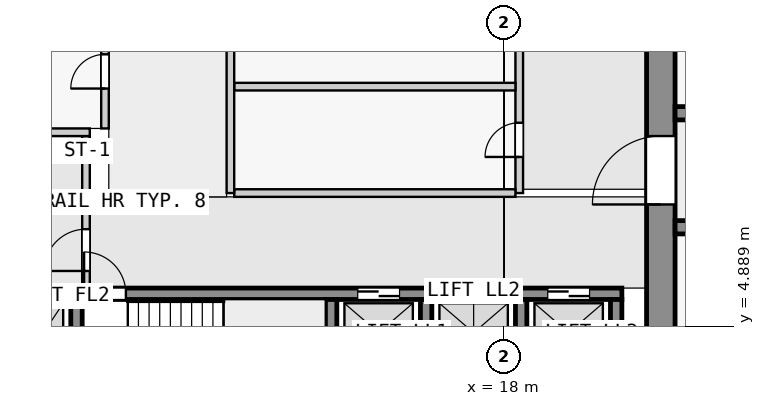
"""IFC4 building model, lengths in metres.
Left out: names, types, materials, properties, quantities, classifications, styles, units other than length and angle.
Written with IfcOpenShell. Run it as: python <this file> out.ifc"""

import sys

from ifc_helpers import new_model, si_unit, direction, frame, frame_2d, origin, place, context, subcontext, project, spatial, rectangle, extrude, element, fill, save


model = new_model("IFC4")
c1 = context("Model", 3, precision=1e-05, world=origin(), true_north=direction((0.0, 1.0)))
c2 = subcontext(c1, "Body", "Model", "MODEL_VIEW")
j1 = project(units=[si_unit("LENGTHUNIT", "METRE"), si_unit("PLANEANGLEUNIT", "RADIAN")], contexts=[c1])
p1 = place(None, origin())
s1 = spatial("IfcSite", under=j1, at=p1, CompositionType="ELEMENT")
p2 = place(p1, origin())
s2 = spatial("IfcBuilding", under=s1, at=p2, CompositionType="ELEMENT")
p3 = place(p2, frame((0.0, 0.0, 26.8)))
s3 = spatial("IfcBuildingStorey", under=s2, at=p3, CompositionType="ELEMENT", Elevation=26.8)
p4 = place(p3, frame((22.125, 2.5, 0.0), z_axis=(0.0, 0.0, 1.0), x_axis=(0.0, 1.0, 0.0)))
e1 = element("IfcWall", 1, at=p4, inside=s3, PredefinedType="SHEAR", context=c2, shape_type="SweptSolid", body=[
    extrude(rectangle(XDim=14.75, YDim=0.75, at=frame_2d((7.375, 0.0))), origin(), (0.0, 0.0, 1.0), 3.25),
])
p5 = place(p4, frame((5.6, 0.0, 0.0)))
e2 = element("IfcOpeningElement", 2, at=p5, cuts=e1, PredefinedType="OPENING", context=c2, shape_type="SweptSolid", body=[
    extrude(rectangle(XDim=1.8, YDim=2.1, at=frame_2d((0.9, 1.05))), frame((0.0, 0.385, 0.0), z_axis=(0.0, -1.0, 0.0), x_axis=(1.0, 0.0, 0.0)), (0.0, 0.0, 1.0), 0.77),
])
for number, where, z_axis, x_axis in (
    (3, (6.75, 2.8, 0.0), (0.0, 0.0, 1.0), (0.0, 1.0, 0.0)),
    (4, (13.45, 2.8, 0.0), (0.0, 0.0, 1.0), (0.0, 1.0, 0.0)),
    (5, (15.95, 2.8, 0.0), (0.0, 0.0, 1.0), (0.0, 1.0, 0.0)),
    (6, (18.45, 2.8, 0.0), (0.0, 0.0, 1.0), (0.0, 1.0, 0.0)),
    (7, (20.95, 2.8, 0.0), (0.0, 0.0, 1.0), (0.0, 1.0, 0.0)),
):
    element("IfcWall", number, at=place(p3, frame(where, z_axis=z_axis, x_axis=x_axis)), inside=s3, PredefinedType="SHEAR", context=c2, shape_type="SweptSolid", body=[
        extrude(rectangle(XDim=2.8, YDim=0.3, at=frame_2d((1.4, 0.0))), origin(), (0.0, 0.0, 1.0), 3.25),
    ])
p6 = place(p3, frame((2.3, 5.75, 0.0), z_axis=(0.0, 0.0, 1.0), x_axis=(1.0, 0.0, 0.0)))
e8 = element("IfcWall", 8, at=p6, inside=s3, PredefinedType="SHEAR", context=c2, shape_type="SweptSolid", body=[
    extrude(rectangle(XDim=18.8, YDim=0.3, at=frame_2d((9.4, 0.0))), origin(), (0.0, 0.0, 1.0), 3.25),
])
p7 = place(p6, frame((4.65, 0.0, 0.0)))
e9 = element("IfcOpeningElement", 9, at=p7, cuts=e8, PredefinedType="OPENING", context=c2, shape_type="SweptSolid", body=[
    extrude(rectangle(XDim=1.1, YDim=2.1, at=frame_2d((0.55, 1.05))), frame((0.0, 0.16, 0.0), z_axis=(0.0, -1.0, 0.0), x_axis=(1.0, 0.0, 0.0)), (0.0, 0.0, 1.0), 0.32),
])
p8 = place(p6, frame((0.45, 0.0, 0.0)))
e10 = element("IfcOpeningElement", 10, at=p8, cuts=e8, PredefinedType="OPENING", context=c2, shape_type="SweptSolid", body=[
    extrude(rectangle(XDim=1.1, YDim=2.1, at=frame_2d((0.55, 1.05))), frame((0.0, 0.16, 0.0), z_axis=(0.0, -1.0, 0.0), x_axis=(1.0, 0.0, 0.0)), (0.0, 0.0, 1.0), 0.32),
])
p9 = place(p6, frame((2.75, 0.0, 0.0)))
e11 = element("IfcOpeningElement", 11, at=p9, cuts=e8, PredefinedType="OPENING", context=c2, shape_type="SweptSolid", body=[
    extrude(rectangle(XDim=1.1, YDim=2.1, at=frame_2d((0.55, 1.05))), frame((0.0, 0.16, 0.0), z_axis=(0.0, -1.0, 0.0), x_axis=(1.0, 0.0, 0.0)), (0.0, 0.0, 1.0), 0.32),
])
p10 = place(p6, frame((11.85, 0.0, 0.0)))
e12 = element("IfcOpeningElement", 12, at=p10, cuts=e8, PredefinedType="OPENING", context=c2, shape_type="SweptSolid", body=[
    extrude(rectangle(XDim=1.1, YDim=2.1, at=frame_2d((0.55, 1.05))), frame((0.0, 0.16, 0.0), z_axis=(0.0, -1.0, 0.0), x_axis=(1.0, 0.0, 0.0)), (0.0, 0.0, 1.0), 0.32),
])
p11 = place(p6, frame((14.35, 0.0, 0.0)))
e13 = element("IfcOpeningElement", 13, at=p11, cuts=e8, PredefinedType="OPENING", context=c2, shape_type="SweptSolid", body=[
    extrude(rectangle(XDim=1.1, YDim=2.1, at=frame_2d((0.55, 1.05))), frame((0.0, 0.16, 0.0), z_axis=(0.0, -1.0, 0.0), x_axis=(1.0, 0.0, 0.0)), (0.0, 0.0, 1.0), 0.32),
])
p12 = place(p6, frame((16.85, 0.0, 0.0)))
e14 = element("IfcOpeningElement", 14, at=p12, cuts=e8, PredefinedType="OPENING", context=c2, shape_type="SweptSolid", body=[
    extrude(rectangle(XDim=1.1, YDim=2.1, at=frame_2d((0.55, 1.05))), frame((0.0, 0.16, 0.0), z_axis=(0.0, -1.0, 0.0), x_axis=(1.0, 0.0, 0.0)), (0.0, 0.0, 1.0), 0.32),
])
p13 = place(p3, frame((22.5, 7.5, 0.0), z_axis=(0.0, 0.0, 1.0), x_axis=(1.0, 0.0, 0.0)))
e15 = element("IfcWall", 15, at=p13, inside=s3, PredefinedType="SHEAR", context=c2, shape_type="SweptSolid", body=[
    extrude(rectangle(XDim=22.5, YDim=0.35, at=frame_2d((11.25, 0.0))), origin(), (0.0, 0.0, 1.0), 3.25),
])
p14 = place(p13, frame((4.05, 0.0, 0.0)))
e16 = element("IfcOpeningElement", 16, at=p14, cuts=e15, PredefinedType="OPENING", context=c2, shape_type="SweptSolid", body=[
    extrude(rectangle(XDim=1.0, YDim=2.1, at=frame_2d((0.5, 1.05))), frame((0.0, 0.185, 0.0), z_axis=(0.0, -1.0, 0.0), x_axis=(1.0, 0.0, 0.0)), (0.0, 0.0, 1.0), 0.37),
])
p15 = place(p13, frame((10.75, 0.0, 0.0)))
e17 = element("IfcOpeningElement", 17, at=p15, cuts=e15, PredefinedType="OPENING", context=c2, shape_type="SweptSolid", body=[
    extrude(rectangle(XDim=1.0, YDim=2.1, at=frame_2d((0.5, 1.05))), frame((0.0, 0.185, 0.0), z_axis=(0.0, -1.0, 0.0), x_axis=(1.0, 0.0, 0.0)), (0.0, 0.0, 1.0), 0.37),
])
p16 = place(p13, frame((15.25, 0.0, 0.0)))
e18 = element("IfcOpeningElement", 18, at=p16, cuts=e15, PredefinedType="OPENING", context=c2, shape_type="SweptSolid", body=[
    extrude(rectangle(XDim=1.0, YDim=2.1, at=frame_2d((0.5, 1.05))), frame((0.0, 0.185, 0.0), z_axis=(0.0, -1.0, 0.0), x_axis=(1.0, 0.0, 0.0)), (0.0, 0.0, 1.0), 0.37),
])
p17 = place(p13, frame((18.75, 0.0, 0.0)))
e19 = element("IfcOpeningElement", 19, at=p17, cuts=e15, PredefinedType="OPENING", context=c2, shape_type="SweptSolid", body=[
    extrude(rectangle(XDim=0.9, YDim=2.1, at=frame_2d((0.45, 1.05))), frame((0.0, 0.185, 0.0), z_axis=(0.0, -1.0, 0.0), x_axis=(1.0, 0.0, 0.0)), (0.0, 0.0, 1.0), 0.37),
])
p18 = place(p13, frame((20.95, 0.0, 0.0)))
e20 = element("IfcOpeningElement", 20, at=p18, cuts=e15, PredefinedType="OPENING", context=c2, shape_type="SweptSolid", body=[
    extrude(rectangle(XDim=1.0, YDim=2.1, at=frame_2d((0.5, 1.05))), frame((0.0, 0.185, 0.0), z_axis=(0.0, -1.0, 0.0), x_axis=(1.0, 0.0, 0.0)), (0.0, 0.0, 1.0), 0.37),
])
p19 = place(p3, frame((22.5, 10.5, 0.0), z_axis=(0.0, 0.0, 1.0), x_axis=(1.0, 0.0, 0.0)))
e21 = element("IfcWall", 21, at=p19, inside=s3, PredefinedType="SHEAR", context=c2, shape_type="SweptSolid", body=[
    extrude(rectangle(XDim=22.5, YDim=0.35, at=frame_2d((11.25, 0.0))), origin(), (0.0, 0.0, 1.0), 3.25),
])
p20 = place(p19, frame((6.05, 0.0, 0.0)))
e22 = element("IfcOpeningElement", 22, at=p20, cuts=e21, PredefinedType="OPENING", context=c2, shape_type="SweptSolid", body=[
    extrude(rectangle(XDim=1.0, YDim=2.1, at=frame_2d((0.5, 1.05))), frame((0.0, 0.185, 0.0), z_axis=(0.0, -1.0, 0.0), x_axis=(1.0, 0.0, 0.0)), (0.0, 0.0, 1.0), 0.37),
])
p21 = place(p19, frame((15.25, 0.0, 0.0)))
e23 = element("IfcOpeningElement", 23, at=p21, cuts=e21, PredefinedType="OPENING", context=c2, shape_type="SweptSolid", body=[
    extrude(rectangle(XDim=1.0, YDim=2.1, at=frame_2d((0.5, 1.05))), frame((0.0, 0.185, 0.0), z_axis=(0.0, -1.0, 0.0), x_axis=(1.0, 0.0, 0.0)), (0.0, 0.0, 1.0), 0.37),
])
p22 = place(p19, frame((19.75, 0.0, 0.0)))
e24 = element("IfcOpeningElement", 24, at=p22, cuts=e21, PredefinedType="OPENING", context=c2, shape_type="SweptSolid", body=[
    extrude(rectangle(XDim=1.0, YDim=2.1, at=frame_2d((0.5, 1.05))), frame((0.0, 0.185, 0.0), z_axis=(0.0, -1.0, 0.0), x_axis=(1.0, 0.0, 0.0)), (0.0, 0.0, 1.0), 0.37),
])
p23 = place(p3, frame((7.0, 5.9, 0.0), z_axis=(0.0, 0.0, 1.0), x_axis=(0.0, 1.0, 0.0)))
e25 = element("IfcWall", 25, at=p23, inside=s3, PredefinedType="PARTITIONING", context=c2, shape_type="SweptSolid", body=[
    extrude(rectangle(XDim=4.0, YDim=0.2, at=frame_2d((2.0, 0.0))), origin(), (0.0, 0.0, 1.0), 3.25),
])
p24 = place(p23, frame((0.45, 0.0, 0.0)))
e26 = element("IfcOpeningElement", 26, at=p24, cuts=e25, PredefinedType="OPENING", context=c2, shape_type="SweptSolid", body=[
    extrude(rectangle(XDim=1.1, YDim=2.1, at=frame_2d((0.55, 1.05))), frame((0.0, 0.11, 0.0), z_axis=(0.0, -1.0, 0.0), x_axis=(1.0, 0.0, 0.0)), (0.0, 0.0, 1.0), 0.22),
])
p25 = place(p3, frame((5.15, 10.0, 0.0), z_axis=(0.0, 0.0, 1.0), x_axis=(1.0, 0.0, 0.0)))
e27 = element("IfcWall", 27, at=p25, inside=s3, PredefinedType="PARTITIONING", context=c2, shape_type="SweptSolid", body=[
    extrude(rectangle(XDim=1.95, YDim=0.2, at=frame_2d((0.975, 0.0))), origin(), (0.0, 0.0, 1.0), 3.25),
])
p26 = place(p3, frame((10.8, 8.4, 0.0), z_axis=(0.0, 0.0, 1.0), x_axis=(0.0, 1.0, 0.0)))
e28 = element("IfcWall", 28, at=p26, inside=s3, PredefinedType="PARTITIONING", context=c2, shape_type="SweptSolid", body=[
    extrude(rectangle(XDim=6.2, YDim=0.2, at=frame_2d((3.1, 0.0))), origin(), (0.0, 0.0, 1.0), 3.25),
])
p27 = place(p3, frame((10.9, 8.4, 0.0), z_axis=(0.0, 0.0, 1.0), x_axis=(1.0, 0.0, 0.0)))
e29 = element("IfcWall", 29, at=p27, inside=s3, PredefinedType="PARTITIONING", context=c2, shape_type="SweptSolid", body=[
    extrude(rectangle(XDim=7.4, YDim=0.2, at=frame_2d((3.7, 0.0))), origin(), (0.0, 0.0, 1.0), 3.25),
])
p28 = place(p3, frame((18.4, 8.4, 0.0), z_axis=(0.0, 0.0, 1.0), x_axis=(0.0, 1.0, 0.0)))
e30 = element("IfcWall", 30, at=p28, inside=s3, PredefinedType="PARTITIONING", context=c2, shape_type="SweptSolid", body=[
    extrude(rectangle(XDim=6.2, YDim=0.2, at=frame_2d((3.1, 0.0))), origin(), (0.0, 0.0, 1.0), 3.25),
])
p29 = place(p28, frame((0.95, 0.0, 0.0)))
e31 = element("IfcOpeningElement", 31, at=p29, cuts=e30, PredefinedType="OPENING", context=c2, shape_type="SweptSolid", body=[
    extrude(rectangle(XDim=0.9, YDim=2.1, at=frame_2d((0.45, 1.05))), frame((0.0, 0.11, 0.0), z_axis=(0.0, -1.0, 0.0), x_axis=(1.0, 0.0, 0.0)), (0.0, 0.0, 1.0), 0.22),
])
p30 = place(p28, frame((4.05, 0.0, 0.0)))
e32 = element("IfcOpeningElement", 32, at=p30, cuts=e30, PredefinedType="OPENING", context=c2, shape_type="SweptSolid", body=[
    extrude(rectangle(XDim=0.9, YDim=2.1, at=frame_2d((0.45, 1.05))), frame((0.0, 0.11, 0.0), z_axis=(0.0, -1.0, 0.0), x_axis=(1.0, 0.0, 0.0)), (0.0, 0.0, 1.0), 0.22),
])
p31 = place(p3, frame((10.9, 11.2, 0.0), z_axis=(0.0, 0.0, 1.0), x_axis=(1.0, 0.0, 0.0)))
e33 = element("IfcWall", 33, at=p31, inside=s3, PredefinedType="PARTITIONING", context=c2, shape_type="SweptSolid", body=[
    extrude(rectangle(XDim=7.4, YDim=0.2, at=frame_2d((3.7, 0.0))), origin(), (0.0, 0.0, 1.0), 3.25),
])
p32 = place(p3, frame((7.5, 10.1, 0.0), z_axis=(0.0, 0.0, 1.0), x_axis=(0.0, 1.0, 0.0)))
e34 = element("IfcWall", 34, at=p32, inside=s3, PredefinedType="PARTITIONING", context=c2, shape_type="SweptSolid", body=[
    extrude(rectangle(XDim=7.15, YDim=0.2, at=frame_2d((3.575, 0.0))), origin(), (0.0, 0.0, 1.0), 3.25),
])
p33 = place(p32, frame((1.05, 0.0, 0.0)))
e35 = element("IfcOpeningElement", 35, at=p33, cuts=e34, PredefinedType="OPENING", context=c2, shape_type="SweptSolid", body=[
    extrude(rectangle(XDim=0.9, YDim=2.1, at=frame_2d((0.45, 1.05))), frame((0.0, 0.11, 0.0), z_axis=(0.0, -1.0, 0.0), x_axis=(1.0, 0.0, 0.0)), (0.0, 0.0, 1.0), 0.22),
])
p34 = place(p32, frame((4.625, 0.0, 0.0)))
e36 = element("IfcOpeningElement", 36, at=p34, cuts=e34, PredefinedType="OPENING", context=c2, shape_type="SweptSolid", body=[
    extrude(rectangle(XDim=0.9, YDim=2.1, at=frame_2d((0.45, 1.05))), frame((0.0, 0.11, 0.0), z_axis=(0.0, -1.0, 0.0), x_axis=(1.0, 0.0, 0.0)), (0.0, 0.0, 1.0), 0.22),
])
p35 = place(p24, origin())
e37 = element("IfcDoor", 37, at=p35, inside=s3, OperationType="SINGLE_SWING_LEFT", PredefinedType="DOOR", context=c2, shape_type="SweptSolid", body=[
    extrude(rectangle(XDim=1.1, YDim=2.1, at=frame_2d((0.55, 1.05))), frame((0.0, 0.025, 0.0), z_axis=(0.0, -1.0, 0.0), x_axis=(1.0, 0.0, 0.0)), (0.0, 0.0, 1.0), 0.05),
])
fill(e26, e37)
p36 = place(p29, origin())
e38 = element("IfcDoor", 38, at=p36, inside=s3, OperationType="SINGLE_SWING_LEFT", PredefinedType="DOOR", context=c2, shape_type="SweptSolid", body=[
    extrude(rectangle(XDim=0.9, YDim=2.1, at=frame_2d((0.45, 1.05))), frame((0.0, 0.025, 0.0), z_axis=(0.0, -1.0, 0.0), x_axis=(1.0, 0.0, 0.0)), (0.0, 0.0, 1.0), 0.05),
])
fill(e31, e38)
p37 = place(p7, origin())
e39 = element("IfcDoor", 39, at=p37, inside=s3, OperationType="SINGLE_SWING_LEFT", PredefinedType="DOOR", context=c2, shape_type="SweptSolid", body=[
    extrude(rectangle(XDim=1.1, YDim=2.1, at=frame_2d((0.55, 1.05))), frame((0.0, 0.025, 0.0), z_axis=(0.0, -1.0, 0.0), x_axis=(1.0, 0.0, 0.0)), (0.0, 0.0, 1.0), 0.05),
])
fill(e9, e39)
p38 = place(p9, origin())
e40 = element("IfcDoor", 40, at=p38, inside=s3, OperationType="DOUBLE_DOOR_SLIDING", PredefinedType="DOOR", context=c2, shape_type="SweptSolid", body=[
    extrude(rectangle(XDim=1.1, YDim=2.1, at=frame_2d((0.55, 1.05))), frame((0.0, 0.025, 0.0), z_axis=(0.0, -1.0, 0.0), x_axis=(1.0, 0.0, 0.0)), (0.0, 0.0, 1.0), 0.05),
])
fill(e11, e40)
p39 = place(p10, origin())
e41 = element("IfcDoor", 41, at=p39, inside=s3, OperationType="DOUBLE_DOOR_SLIDING", PredefinedType="DOOR", context=c2, shape_type="SweptSolid", body=[
    extrude(rectangle(XDim=1.1, YDim=2.1, at=frame_2d((0.55, 1.05))), frame((0.0, 0.025, 0.0), z_axis=(0.0, -1.0, 0.0), x_axis=(1.0, 0.0, 0.0)), (0.0, 0.0, 1.0), 0.05),
])
fill(e12, e41)
p40 = place(p11, origin())
e42 = element("IfcDoor", 42, at=p40, inside=s3, OperationType="DOUBLE_DOOR_SLIDING", PredefinedType="DOOR", context=c2, shape_type="SweptSolid", body=[
    extrude(rectangle(XDim=1.1, YDim=2.1, at=frame_2d((0.55, 1.05))), frame((0.0, 0.025, 0.0), z_axis=(0.0, -1.0, 0.0), x_axis=(1.0, 0.0, 0.0)), (0.0, 0.0, 1.0), 0.05),
])
fill(e13, e42)
p41 = place(p12, origin())
e43 = element("IfcDoor", 43, at=p41, inside=s3, OperationType="DOUBLE_DOOR_SLIDING", PredefinedType="DOOR", context=c2, shape_type="SweptSolid", body=[
    extrude(rectangle(XDim=1.1, YDim=2.1, at=frame_2d((0.55, 1.05))), frame((0.0, 0.025, 0.0), z_axis=(0.0, -1.0, 0.0), x_axis=(1.0, 0.0, 0.0)), (0.0, 0.0, 1.0), 0.05),
])
fill(e14, e43)
p42 = place(p5, origin())
e44 = element("IfcDoor", 44, at=p42, inside=s3, OperationType="DOUBLE_DOOR_SINGLE_SWING", PredefinedType="DOOR", context=c2, shape_type="SweptSolid", body=[
    extrude(rectangle(XDim=1.8, YDim=2.1, at=frame_2d((0.9, 1.05))), frame((0.0, 0.025, 0.0), z_axis=(0.0, -1.0, 0.0), x_axis=(1.0, 0.0, 0.0)), (0.0, 0.0, 1.0), 0.05),
])
fill(e2, e44)
p43 = place(p33, origin())
e45 = element("IfcDoor", 45, at=p43, inside=s3, OperationType="SINGLE_SWING_RIGHT", PredefinedType="DOOR", context=c2, shape_type="SweptSolid", body=[
    extrude(rectangle(XDim=0.9, YDim=2.1, at=frame_2d((0.45, 1.05))), frame((0.0, 0.025, 0.0), z_axis=(0.0, -1.0, 0.0), x_axis=(1.0, 0.0, 0.0)), (0.0, 0.0, 1.0), 0.05),
])
fill(e35, e45)
save(model, sys.argv[1])
